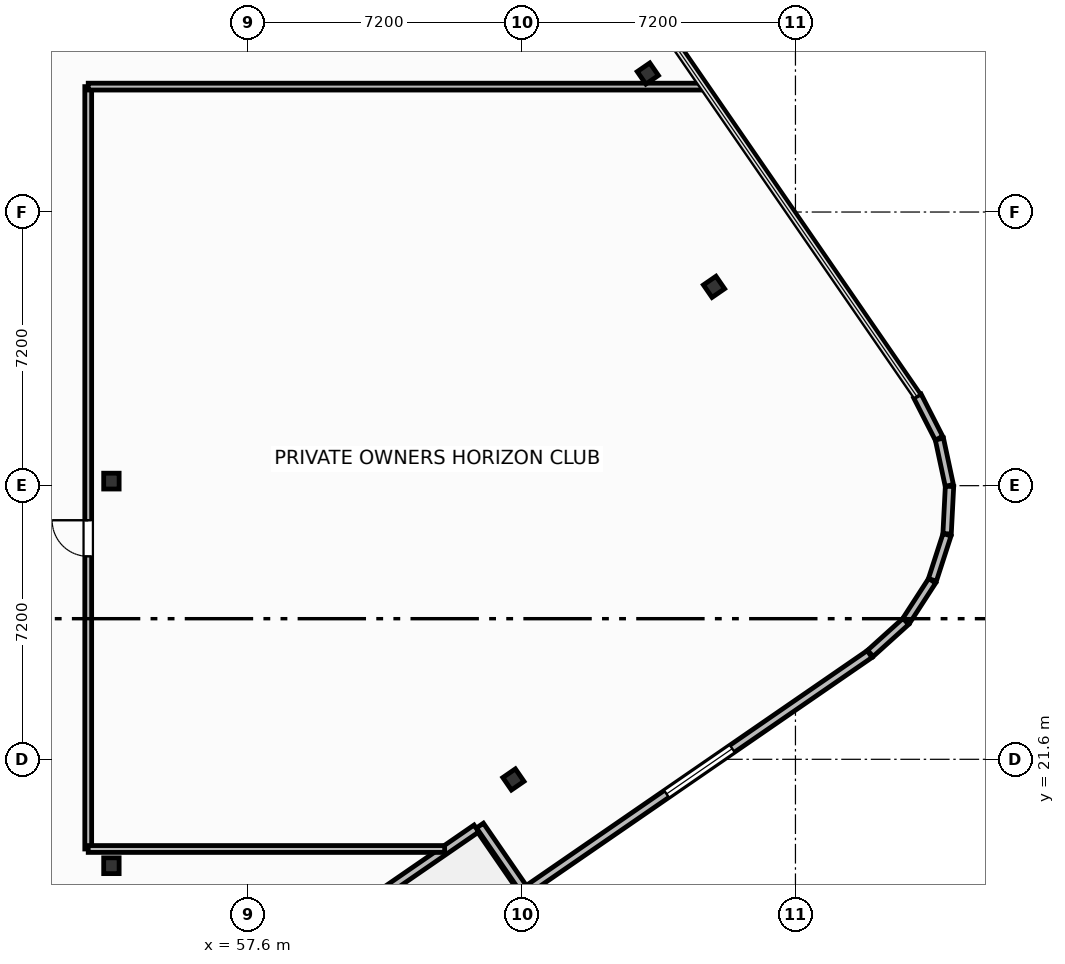
"""IFC4 building model, lengths in metres.
Left out: names, types, materials, properties, quantities, classifications, styles, units other than length and angle.
Written with IfcOpenShell. Run it as: python <this file> out.ifc"""

import sys

from ifc_helpers import new_model, si_unit, direction, frame, frame_2d, origin, origin_2d, place, context, subcontext, project, spatial, rectangle, i_section, extrude, element, fill, save


model = new_model("IFC4")
c1 = context("Model", 3, precision=1e-05, world=origin(), true_north=direction((0.0, 1.0)))
c2 = subcontext(c1, "Body", "Model", "MODEL_VIEW")
j1 = project(units=[si_unit("LENGTHUNIT", "METRE"), si_unit("PLANEANGLEUNIT", "RADIAN")], contexts=[c1])
p1 = place(None, origin())
s1 = spatial("IfcSite", under=j1, at=p1, CompositionType="ELEMENT")
p2 = place(p1, origin())
s2 = spatial("IfcBuilding", under=s1, at=p2, CompositionType="ELEMENT")
p3 = place(p2, frame((0.0, 0.0, 261.9)))
s3 = spatial("IfcBuildingStorey", under=s2, at=p3, CompositionType="ELEMENT", Elevation=261.9)
for number, where, z_axis, x_axis in (
    (1, (54.0, 18.8, 0.0), (0.0, 0.0, 1.0), (1.0, 0.0, 0.0)),
    (2, (54.0, 28.92, 0.0), (0.0, 0.0, 1.0), (1.0, 0.0, 0.0)),
):
    element("IfcColumn", number, at=place(p3, frame(where, z_axis=z_axis, x_axis=x_axis)), inside=s3, PredefinedType="COLUMN", context=c2, shape_type="SweptSolid", body=[
        extrude(i_section(OverallWidth=0.406, OverallDepth=0.416, WebThickness=0.03, FlangeThickness=0.048, FilletRadius=0.025, at=origin_2d()), origin(), (0.0, 0.0, 1.0), 3.7),
    ])
for number, where, z_axis, x_axis in (
    (3, (64.578, 21.07, 0.0), (0.0, 0.0, 1.0), (0.824, 0.567, 0.0)),
    (4, (69.857, 34.031, 0.0), (0.0, 0.0, 1.0), (0.824, 0.567, 0.0)),
    (5, (68.115, 39.644, 0.0), (0.0, 0.0, 1.0), (0.824, 0.567, 0.0)),
):
    element("IfcColumn", number, at=place(p3, frame(where, z_axis=z_axis, x_axis=x_axis)), inside=s3, PredefinedType="COLUMN", context=c2, shape_type="SweptSolid", body=[
        extrude(i_section(OverallWidth=0.401, OverallDepth=0.399, WebThickness=0.025, FlangeThickness=0.04, FilletRadius=0.022, at=origin_2d()), origin(), (0.0, 0.0, 1.0), 3.7),
    ])
p4 = place(p3, frame((63.605, 19.78, 0.0), z_axis=(0.0, 0.0, 1.0), x_axis=(-0.823541290762, -0.567256328665, 0.0)))
e6 = element("IfcWall", 6, at=p4, inside=s3, PredefinedType="SOLIDWALL", context=c2, shape_type="SweptSolid", body=[
    extrude(rectangle(XDim=5.567, YDim=0.22, at=frame_2d((2.784, 0.0))), origin(), (0.0, 0.0, 1.0), 2.73),
])
p5 = place(p4, frame((3.067, 0.0, 0.0)))
e7 = element("IfcOpeningElement", 7, at=p5, cuts=e6, PredefinedType="OPENING", context=c2, shape_type="SweptSolid", body=[
    extrude(rectangle(XDim=2.1, YDim=2.3, at=frame_2d((1.05, 1.15))), frame((0.0, 0.12, 0.0), z_axis=(0.0, -1.0, 0.0), x_axis=(1.0, 0.0, 0.0)), (0.0, 0.0, 1.0), 0.24),
])
p6 = place(p3, frame((63.698, 19.856, 0.0), z_axis=(0.0, 0.0, 1.0), x_axis=(0.567219383419, -0.823566737474, 0.0)))
e8 = element("IfcWall", 8, at=p6, inside=s3, PredefinedType="SOLIDWALL", context=c2, shape_type="SweptSolid", body=[
    extrude(rectangle(XDim=2.1, YDim=0.22, at=frame_2d((1.05, 0.0))), origin(), (0.0, 0.0, 1.0), 2.73),
])
p7 = place(p3, frame((64.992, 18.198, 0.0), z_axis=(0.0, 0.0, 1.0), x_axis=(0.823538117322, 0.56726093583, 0.0)))
e9 = element("IfcWall", 9, at=p7, inside=s3, PredefinedType="SOLIDWALL", context=c2, shape_type="SweptSolid", body=[
    extrude(rectangle(XDim=10.88, YDim=0.22, at=frame_2d((5.44, 0.0))), origin(), (0.0, 0.0, 1.0), 2.73),
])
p8 = place(p7, frame((4.39, 0.0, 0.8)))
e10 = element("IfcOpeningElement", 10, at=p8, cuts=e9, PredefinedType="OPENING", context=c2, shape_type="SweptSolid", body=[
    extrude(rectangle(XDim=2.1, YDim=1.75, at=frame_2d((1.05, 0.875))), frame((0.0, 0.12, 0.0), z_axis=(0.0, -1.0, 0.0), x_axis=(1.0, 0.0, 0.0)), (0.0, 0.0, 1.0), 0.24),
])
p9 = place(p3, frame((73.971, 24.387, 0.0), z_axis=(0.0, 0.0, 1.0), x_axis=(0.742501517089, 0.669844382764, 0.0)))
e11 = element("IfcWall", 11, at=p9, inside=s3, PredefinedType="SOLIDWALL", context=c2, shape_type="SweptSolid", body=[
    extrude(rectangle(XDim=1.257, YDim=0.22, at=frame_2d((0.628, 0.0))), origin(), (0.0, 0.0, 1.0), 2.73),
])
p10 = place(p3, frame((74.917, 25.25, 0.0), z_axis=(0.0, 0.0, 1.0), x_axis=(0.543778157277, 0.839229000731, 0.0)))
e12 = element("IfcWall", 12, at=p10, inside=s3, PredefinedType="SOLIDWALL", context=c2, shape_type="SweptSolid", body=[
    extrude(rectangle(XDim=1.249, YDim=0.22, at=frame_2d((0.624, 0.0))), origin(), (0.0, 0.0, 1.0), 2.73),
])
for number, where, z_axis, x_axis in (
    (13, (75.604, 26.321, 0.0), (0.0, 0.0, 1.0), (0.308, 0.951, 0.0)),
    (14, (75.99, 27.534, 0.0), (0.0, 0.0, 1.0), (0.051, 0.999, 0.0)),
    (15, (76.049, 28.805, 0.0), (0.0, 0.0, 1.0), (-0.209, 0.978, 0.0)),
    (16, (75.777, 30.049, 0.0), (0.0, 0.0, 1.0), (-0.455, 0.891, 0.0)),
):
    element("IfcWall", number, at=place(p3, frame(where, z_axis=z_axis, x_axis=x_axis)), inside=s3, PredefinedType="SOLIDWALL", context=c2, shape_type="SweptSolid", body=[
        extrude(rectangle(XDim=1.249, YDim=0.22, at=frame_2d((0.625, 0.0))), origin(), (0.0, 0.0, 1.0), 2.73),
    ])
p11 = place(p3, frame((53.39, 19.24, 0.0), z_axis=(0.0, 0.0, 1.0), x_axis=(0.0, 1.0, 0.0)))
e17 = element("IfcWall", 17, at=p11, inside=s3, PredefinedType="PARTITIONING", context=c2, shape_type="SweptSolid", body=[
    extrude(rectangle(XDim=20.06, YDim=0.18, at=frame_2d((10.03, 0.0))), origin(), (0.0, 0.0, 1.0), 3.45),
])
p12 = place(p11, frame((7.7, 0.0, 0.0)))
e18 = element("IfcOpeningElement", 18, at=p12, cuts=e17, PredefinedType="OPENING", context=c2, shape_type="SweptSolid", body=[
    extrude(rectangle(XDim=0.95, YDim=2.05, at=frame_2d((0.475, 1.025))), frame((0.0, 0.1, 0.0), z_axis=(0.0, -1.0, 0.0), x_axis=(1.0, 0.0, 0.0)), (0.0, 0.0, 1.0), 0.2),
])
p13 = place(p3, frame((53.39, 19.24, 0.0), z_axis=(0.0, 0.0, 1.0), x_axis=(1.0, 0.0, 0.0)))
e19 = element("IfcWall", 19, at=p13, inside=s3, PredefinedType="PARTITIONING", context=c2, shape_type="SweptSolid", body=[
    extrude(rectangle(XDim=9.378, YDim=0.18, at=frame_2d((4.689, 0.0))), origin(), (0.0, 0.0, 1.0), 2.739),
])
p14 = place(p3, frame((53.39, 39.3, 0.0), z_axis=(0.0, 0.0, 1.0), x_axis=(1.0, 0.0, 0.0)))
e20 = element("IfcWall", 20, at=p14, inside=s3, PredefinedType="PARTITIONING", context=c2, shape_type="SweptSolid", body=[
    extrude(rectangle(XDim=16.149, YDim=0.18, at=frame_2d((8.075, 0.0))), origin(), (0.0, 0.0, 1.0), 2.739),
])
p15 = place(p8, origin())
e21 = element("IfcWindow", 21, at=p15, inside=s3, PartitioningType="SINGLE_PANEL", PredefinedType="WINDOW", context=c2, shape_type="SweptSolid", body=[
    extrude(rectangle(XDim=2.1, YDim=1.75, at=frame_2d((1.05, 0.875))), frame((0.0, 0.03, 0.0), z_axis=(0.0, -1.0, 0.0), x_axis=(1.0, 0.0, 0.0)), (0.0, 0.0, 1.0), 0.06),
])
fill(e10, e21)
p16 = place(p12, origin())
e22 = element("IfcDoor", 22, at=p16, inside=s3, OperationType="SINGLE_SWING_RIGHT", PredefinedType="DOOR", context=c2, shape_type="SweptSolid", body=[
    extrude(rectangle(XDim=0.95, YDim=2.05, at=frame_2d((0.475, 1.025))), frame((0.0, 0.025, 0.0), z_axis=(0.0, -1.0, 0.0), x_axis=(1.0, 0.0, 0.0)), (0.0, 0.0, 1.0), 0.05),
])
fill(e18, e22)
save(model, sys.argv[1])
